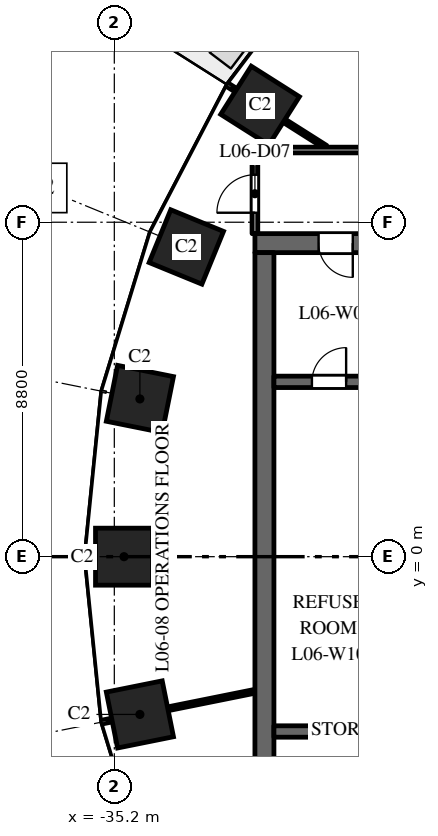
"""IFC4 building model, lengths in metres.
Left out: names, types, materials, properties, quantities, classifications, styles, units other than length and angle.
Written with IfcOpenShell. Run it as: python <this file> out.ifc"""

import sys

from ifc_helpers import new_model, si_unit, direction, frame, frame_2d, origin, origin_2d, place, context, subcontext, project, spatial, rectangle, extrude, element, fill, save


model = new_model("IFC4")
c1 = context("Model", 3, precision=1e-05, world=origin(), true_north=direction((0.0, 1.0)))
c2 = subcontext(c1, "Body", "Model", "MODEL_VIEW")
j1 = project(units=[si_unit("LENGTHUNIT", "METRE"), si_unit("PLANEANGLEUNIT", "RADIAN")], contexts=[c1])
p1 = place(None, origin())
s1 = spatial("IfcSite", under=j1, at=p1, CompositionType="ELEMENT")
p2 = place(p1, origin())
s2 = spatial("IfcBuilding", under=s1, at=p2, CompositionType="ELEMENT")
p3 = place(p2, frame((0.0, 0.0, 34.5)))
s3 = spatial("IfcBuildingStorey", under=s2, at=p3, CompositionType="ELEMENT", Elevation=34.5)
for number, where, z_axis, x_axis in (
    (1, (-31.365, 11.871, 0.0), (0.0, 0.0, 1.0), (-0.535, -0.845, 0.0)),
    (2, (-33.305, 8.149, 0.0), (0.0, 0.0, 1.0), (-0.379, -0.925, 0.0)),
    (3, (-34.527, 4.151, 0.0), (0.0, 0.0, 1.0), (-0.197, -0.98, 0.0)),
    (4, (-34.945, 0.0, 0.0), (0.0, 0.0, 1.0), (0.0, -1.0, 0.0)),
    (5, (-34.527, -4.151, 0.0), (0.0, 0.0, 1.0), (0.197, -0.98, 0.0)),
):
    element("IfcColumn", number, at=place(p3, frame(where, z_axis=z_axis, x_axis=x_axis)), inside=s3, PredefinedType="COLUMN", context=c2, shape_type="SweptSolid", body=[
        extrude(rectangle(XDim=1.5, YDim=1.5, at=origin_2d()), origin(), (0.0, 0.0, 1.0), 4.0),
    ])
p4 = place(p3, frame((-16.5, 8.25, 0.0), z_axis=(0.0, 0.0, 1.0), x_axis=(-1.0, 0.0, 0.0)))
e6 = element("IfcWall", 6, at=p4, inside=s3, PredefinedType="SHEAR", context=c2, shape_type="SweptSolid", body=[
    extrude(rectangle(XDim=15.0, YDim=0.5, at=frame_2d((7.5, 0.0))), origin(), (0.0, 0.0, 1.0), 3.7),
])
p5 = place(p4, frame((6.9, 0.0, 0.0)))
e7 = element("IfcOpeningElement", 7, at=p5, cuts=e6, PredefinedType="OPENING", context=c2, shape_type="SweptSolid", body=[
    extrude(rectangle(XDim=1.2, YDim=2.1, at=frame_2d((0.6, 1.05))), frame((0.0, 0.26, 0.0), z_axis=(0.0, -1.0, 0.0), x_axis=(1.0, 0.0, 0.0)), (0.0, 0.0, 1.0), 0.52),
])
p6 = place(p4, frame((12.425, 0.0, 0.0)))
e8 = element("IfcOpeningElement", 8, at=p6, cuts=e6, PredefinedType="OPENING", context=c2, shape_type="SweptSolid", body=[
    extrude(rectangle(XDim=0.9, YDim=2.1, at=frame_2d((0.45, 1.05))), frame((0.0, 0.26, 0.0), z_axis=(0.0, -1.0, 0.0), x_axis=(1.0, 0.0, 0.0)), (0.0, 0.0, 1.0), 0.52),
])
p7 = place(p3, frame((-31.25, -8.0, 0.0), z_axis=(0.0, 0.0, 1.0), x_axis=(0.0, 1.0, 0.0)))
e9 = element("IfcWall", 9, at=p7, inside=s3, PredefinedType="SHEAR", context=c2, shape_type="SweptSolid", body=[
    extrude(rectangle(XDim=16.0, YDim=0.5, at=frame_2d((8.0, 0.0))), origin(), (0.0, 0.0, 1.0), 3.7),
])
p8 = place(p3, frame((-24.9, 4.6, 0.0), z_axis=(0.0, 0.0, 1.0), x_axis=(-1.0, 0.0, 0.0)))
e10 = element("IfcWall", 10, at=p8, inside=s3, PredefinedType="SHEAR", context=c2, shape_type="SweptSolid", body=[
    extrude(rectangle(XDim=6.1, YDim=0.3, at=frame_2d((3.05, 0.0))), origin(), (0.0, 0.0, 1.0), 3.7),
])
p9 = place(p8, frame((4.2, 0.0, 0.0)))
e11 = element("IfcOpeningElement", 11, at=p9, cuts=e10, PredefinedType="OPENING", context=c2, shape_type="SweptSolid", body=[
    extrude(rectangle(XDim=0.9, YDim=2.1, at=frame_2d((0.45, 1.05))), frame((0.0, 0.16, 0.0), z_axis=(0.0, -1.0, 0.0), x_axis=(1.0, 0.0, 0.0)), (0.0, 0.0, 1.0), 0.32),
])
p10 = place(p3, frame((-24.9, -4.6, 0.0), z_axis=(0.0, 0.0, 1.0), x_axis=(-1.0, 0.0, 0.0)))
e12 = element("IfcWall", 12, at=p10, inside=s3, PredefinedType="SHEAR", context=c2, shape_type="SweptSolid", body=[
    extrude(rectangle(XDim=6.1, YDim=0.3, at=frame_2d((3.05, 0.0))), origin(), (0.0, 0.0, 1.0), 3.7),
])
p11 = place(p3, frame((-35.512, -4.349, 0.0), z_axis=(0.0, 0.0, 1.0), x_axis=(0.980357474535, 0.197228857227, 0.0)))
e13 = element("IfcWall", 13, at=p11, inside=s3, PredefinedType="PARTITIONING", context=c2, shape_type="SweptSolid", body=[
    extrude(rectangle(XDim=4.092, YDim=0.1, at=frame_2d((2.046, 0.0))), origin(), (0.0, 0.0, 1.0), 3.2),
])
p12 = place(p3, frame((-32.212, 12.408, 0.0), z_axis=(0.0, 0.0, 1.0), x_axis=(0.844810627195, -0.535065420467, 0.0)))
e14 = element("IfcWall", 14, at=p12, inside=s3, PredefinedType="PARTITIONING", context=c2, shape_type="SweptSolid", body=[
    extrude(rectangle(XDim=3.048, YDim=0.1, at=frame_2d((1.524, 0.0))), origin(), (0.0, 0.0, 1.0), 3.7),
])
p13 = place(p3, frame((-31.5, 8.5, 0.0), z_axis=(0.0, 0.0, 1.0), x_axis=(0.0, 1.0, 0.0)))
e15 = element("IfcWall", 15, at=p13, inside=s3, PredefinedType="PARTITIONING", context=c2, shape_type="SweptSolid", body=[
    extrude(rectangle(XDim=2.2, YDim=0.15, at=frame_2d((1.1, 0.0))), origin(), (0.0, 0.0, 1.0), 3.7),
])
p14 = place(p13, frame((0.55, 0.0, 0.0)))
e16 = element("IfcOpeningElement", 16, at=p14, cuts=e15, PredefinedType="OPENING", context=c2, shape_type="SweptSolid", body=[
    extrude(rectangle(XDim=1.0, YDim=2.1, at=frame_2d((0.5, 1.05))), frame((0.0, 0.085, 0.0), z_axis=(0.0, -1.0, 0.0), x_axis=(1.0, 0.0, 0.0)), (0.0, 0.0, 1.0), 0.17),
])
p15 = place(p3, frame((-31.5, 10.7, 0.0), z_axis=(0.0, 0.0, 1.0), x_axis=(1.0, 0.0, 0.0)))
e17 = element("IfcWall", 17, at=p15, inside=s3, PredefinedType="PARTITIONING", context=c2, shape_type="SweptSolid", body=[
    extrude(rectangle(XDim=15.0, YDim=0.15, at=frame_2d((7.5, 0.0))), origin(), (0.0, 0.0, 1.0), 3.1),
])
p16 = place(p15, frame((9.655, 0.0, 0.0)))
e18 = element("IfcOpeningElement", 18, at=p16, cuts=e17, PredefinedType="OPENING", context=c2, shape_type="SweptSolid", body=[
    extrude(rectangle(XDim=1.0, YDim=2.1, at=frame_2d((0.5, 1.05))), frame((0.0, 0.085, 0.0), z_axis=(0.0, -1.0, 0.0), x_axis=(1.0, 0.0, 0.0)), (0.0, 0.0, 1.0), 0.17),
])
p17 = place(p15, frame((13.35, 0.0, 0.0)))
e19 = element("IfcOpeningElement", 19, at=p17, cuts=e17, PredefinedType="OPENING", context=c2, shape_type="SweptSolid", body=[
    extrude(rectangle(XDim=1.0, YDim=2.1, at=frame_2d((0.5, 1.05))), frame((0.0, 0.085, 0.0), z_axis=(0.0, -1.0, 0.0), x_axis=(1.0, 0.0, 0.0)), (0.0, 0.0, 1.0), 0.17),
])
p18 = place(p6, origin())
e20 = element("IfcDoor", 20, at=p18, inside=s3, OperationType="SINGLE_SWING_RIGHT", PredefinedType="DOOR", context=c2, shape_type="SweptSolid", body=[
    extrude(rectangle(XDim=0.9, YDim=2.1, at=frame_2d((0.45, 1.05))), frame((0.0, 0.025, 0.0), z_axis=(0.0, -1.0, 0.0), x_axis=(1.0, 0.0, 0.0)), (0.0, 0.0, 1.0), 0.05),
])
fill(e8, e20)
p19 = place(p9, origin())
e21 = element("IfcDoor", 21, at=p19, inside=s3, OperationType="SINGLE_SWING_LEFT", PredefinedType="DOOR", context=c2, shape_type="SweptSolid", body=[
    extrude(rectangle(XDim=0.9, YDim=2.1, at=frame_2d((0.45, 1.05))), frame((0.0, 0.025, 0.0), z_axis=(0.0, -1.0, 0.0), x_axis=(1.0, 0.0, 0.0)), (0.0, 0.0, 1.0), 0.05),
])
fill(e11, e21)
p20 = place(p14, origin())
e22 = element("IfcDoor", 22, at=p20, inside=s3, OperationType="SINGLE_SWING_LEFT", PredefinedType="DOOR", context=c2, shape_type="SweptSolid", body=[
    extrude(rectangle(XDim=1.0, YDim=2.1, at=frame_2d((0.5, 1.05))), frame((0.0, 0.025, 0.0), z_axis=(0.0, -1.0, 0.0), x_axis=(1.0, 0.0, 0.0)), (0.0, 0.0, 1.0), 0.05),
])
fill(e16, e22)
save(model, sys.argv[1])
